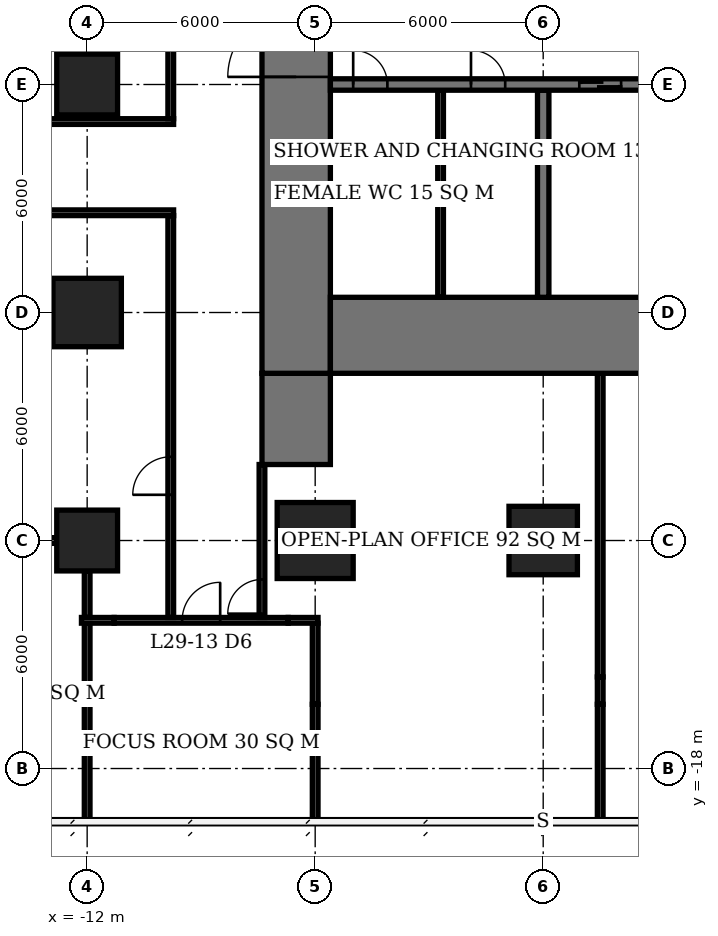
"""IFC4 building model, lengths in metres.
Left out: names, types, materials, properties, quantities, classifications, styles, units other than length and angle.
Written with IfcOpenShell. Run it as: python <this file> out.ifc"""

import sys

from ifc_helpers import new_model, si_unit, direction, frame, frame_2d, origin, origin_2d, place, context, subcontext, project, spatial, rectangle, extrude, element, fill, save


model = new_model("IFC4")
c1 = context("Model", 3, precision=1e-05, world=origin(), true_north=direction((0.0, 1.0)))
c2 = subcontext(c1, "Body", "Model", "MODEL_VIEW")
j1 = project(units=[si_unit("LENGTHUNIT", "METRE"), si_unit("PLANEANGLEUNIT", "RADIAN")], contexts=[c1])
p1 = place(None, origin())
s1 = spatial("IfcSite", under=j1, at=p1, CompositionType="ELEMENT")
p2 = place(p1, origin())
s2 = spatial("IfcBuilding", under=s1, at=p2, CompositionType="ELEMENT")
p3 = place(p2, frame((0.0, 0.0, 121.1)))
s3 = spatial("IfcBuildingStorey", under=s2, at=p3, CompositionType="ELEMENT", Elevation=121.1)
p4 = place(p3, frame((-12.0, -12.0, 0.0), z_axis=(0.0, 0.0, 1.0), x_axis=(1.0, 0.0, 0.0)))
e1 = element("IfcColumn", 1, at=p4, inside=s3, PredefinedType="COLUMN", context=c2, shape_type="SweptSolid", body=[
    extrude(rectangle(XDim=1.6, YDim=1.6, at=origin_2d()), origin(), (0.0, 0.0, 1.0), 3.9),
])
p5 = place(p3, frame((-12.0, -6.0, 0.0), z_axis=(0.0, 0.0, 1.0), x_axis=(1.0, 0.0, 0.0)))
e2 = element("IfcColumn", 2, at=p5, inside=s3, PredefinedType="COLUMN", context=c2, shape_type="SweptSolid", body=[
    extrude(rectangle(XDim=1.8, YDim=1.8, at=origin_2d()), origin(), (0.0, 0.0, 1.0), 3.9),
])
p6 = place(p3, frame((-12.0, 0.0, 0.0), z_axis=(0.0, 0.0, 1.0), x_axis=(1.0, 0.0, 0.0)))
e3 = element("IfcColumn", 3, at=p6, inside=s3, PredefinedType="COLUMN", context=c2, shape_type="SweptSolid", body=[
    extrude(rectangle(XDim=1.6, YDim=1.6, at=origin_2d()), origin(), (0.0, 0.0, 1.0), 3.9),
])
p7 = place(p3, frame((-6.0, -12.0, 0.0), z_axis=(0.0, 0.0, 1.0), x_axis=(1.0, 0.0, 0.0)))
e4 = element("IfcColumn", 4, at=p7, inside=s3, PredefinedType="COLUMN", context=c2, shape_type="SweptSolid", body=[
    extrude(rectangle(XDim=2.0, YDim=2.0, at=origin_2d()), origin(), (0.0, 0.0, 1.0), 3.9),
])
p8 = place(p3, frame((0.0, -12.0, 0.0), z_axis=(0.0, 0.0, 1.0), x_axis=(1.0, 0.0, 0.0)))
e5 = element("IfcColumn", 5, at=p8, inside=s3, PredefinedType="COLUMN", context=c2, shape_type="SweptSolid", body=[
    extrude(rectangle(XDim=1.8, YDim=1.8, at=origin_2d()), origin(), (0.0, 0.0, 1.0), 3.9),
])
p9 = place(p3, frame((-5.6, -6.6, 0.0), z_axis=(0.0, 0.0, 1.0), x_axis=(1.0, 0.0, 0.0)))
e6 = element("IfcWall", 6, at=p9, inside=s3, PredefinedType="SHEAR", context=c2, shape_type="SweptSolid", body=[
    extrude(rectangle(XDim=23.2, YDim=2.0, at=frame_2d((11.6, 0.0))), origin(), (0.0, 0.0, 1.0), 3.9),
])
p10 = place(p3, frame((-6.5, -7.6, 0.0), z_axis=(0.0, 0.0, 1.0), x_axis=(0.0, 1.0, 0.0)))
e7 = element("IfcWall", 7, at=p10, inside=s3, PredefinedType="SHEAR", context=c2, shape_type="SweptSolid", body=[
    extrude(rectangle(XDim=21.2, YDim=1.8, at=frame_2d((10.6, 0.0))), origin(), (0.0, 0.0, 1.0), 3.9),
])
p11 = place(p10, frame((7.8, 0.0, 0.0)))
e8 = element("IfcOpeningElement", 8, at=p11, cuts=e7, PredefinedType="OPENING", context=c2, shape_type="SweptSolid", body=[
    extrude(rectangle(XDim=1.8, YDim=2.4, at=frame_2d((0.9, 1.2))), frame((0.0, 0.91, 0.0), z_axis=(0.0, -1.0, 0.0), x_axis=(1.0, 0.0, 0.0)), (0.0, 0.0, 1.0), 1.82),
])
p12 = place(p3, frame((-6.5, -10.0, 0.0), z_axis=(0.0, 0.0, 1.0), x_axis=(0.0, 1.0, 0.0)))
e9 = element("IfcWall", 9, at=p12, inside=s3, PredefinedType="SHEAR", context=c2, shape_type="SweptSolid", body=[
    extrude(rectangle(XDim=2.4, YDim=1.8, at=frame_2d((1.2, 0.0))), origin(), (0.0, 0.0, 1.0), 3.9),
])
p13 = place(p3, frame((-5.6, 0.0, 0.0), z_axis=(0.0, 0.0, 1.0), x_axis=(1.0, 0.0, 0.0)))
e10 = element("IfcWall", 10, at=p13, inside=s3, PredefinedType="SHEAR", context=c2, shape_type="SweptSolid", body=[
    extrude(rectangle(XDim=17.75, YDim=0.3, at=frame_2d((8.875, 0.0))), origin(), (0.0, 0.0, 1.0), 3.9),
])
p14 = place(p13, frame((0.6, 0.0, 0.0)))
e11 = element("IfcOpeningElement", 11, at=p14, cuts=e10, PredefinedType="OPENING", context=c2, shape_type="SweptSolid", body=[
    extrude(rectangle(XDim=0.9, YDim=2.1, at=frame_2d((0.45, 1.05))), frame((0.0, 0.16, 0.0), z_axis=(0.0, -1.0, 0.0), x_axis=(1.0, 0.0, 0.0)), (0.0, 0.0, 1.0), 0.32),
])
p15 = place(p13, frame((3.7, 0.0, 0.0)))
e12 = element("IfcOpeningElement", 12, at=p15, cuts=e10, PredefinedType="OPENING", context=c2, shape_type="SweptSolid", body=[
    extrude(rectangle(XDim=0.9, YDim=2.1, at=frame_2d((0.45, 1.05))), frame((0.0, 0.16, 0.0), z_axis=(0.0, -1.0, 0.0), x_axis=(1.0, 0.0, 0.0)), (0.0, 0.0, 1.0), 0.32),
])
p16 = place(p13, frame((6.55, 0.0, 0.0)))
e13 = element("IfcOpeningElement", 13, at=p16, cuts=e10, PredefinedType="OPENING", context=c2, shape_type="SweptSolid", body=[
    extrude(rectangle(XDim=1.1, YDim=2.1, at=frame_2d((0.55, 1.05))), frame((0.0, 0.16, 0.0), z_axis=(0.0, -1.0, 0.0), x_axis=(1.0, 0.0, 0.0)), (0.0, 0.0, 1.0), 0.32),
])
p17 = place(p13, frame((9.55, 0.0, 0.0)))
e14 = element("IfcOpeningElement", 14, at=p17, cuts=e10, PredefinedType="OPENING", context=c2, shape_type="SweptSolid", body=[
    extrude(rectangle(XDim=1.1, YDim=2.1, at=frame_2d((0.55, 1.05))), frame((0.0, 0.16, 0.0), z_axis=(0.0, -1.0, 0.0), x_axis=(1.0, 0.0, 0.0)), (0.0, 0.0, 1.0), 0.32),
])
p18 = place(p3, frame((0.0, -5.6, 0.0), z_axis=(0.0, 0.0, 1.0), x_axis=(0.0, 1.0, 0.0)))
e15 = element("IfcWall", 15, at=p18, inside=s3, PredefinedType="SHEAR", context=c2, shape_type="SweptSolid", body=[
    extrude(rectangle(XDim=5.45, YDim=0.3, at=frame_2d((2.725, 0.0))), origin(), (0.0, 0.0, 1.0), 3.9),
])
p19 = place(p3, frame((-2.7, -5.6, 0.0), z_axis=(0.0, 0.0, 1.0), x_axis=(0.0, 1.0, 0.0)))
e16 = element("IfcWall", 16, at=p19, inside=s3, PredefinedType="PLUMBINGWALL", context=c2, shape_type="SweptSolid", body=[
    extrude(rectangle(XDim=5.45, YDim=0.15, at=frame_2d((2.725, 0.0))), origin(), (0.0, 0.0, 1.0), 3.65),
])
p20 = place(p3, frame((-12.15, -14.1, 0.0), z_axis=(0.0, 0.0, 1.0), x_axis=(1.0, 0.0, 0.0)))
e17 = element("IfcWall", 17, at=p20, inside=s3, PredefinedType="PARTITIONING", context=c2, shape_type="SweptSolid", body=[
    extrude(rectangle(XDim=0.86, YDim=0.15, at=frame_2d((0.43, 0.0))), origin(), (0.0, 0.0, 1.0), 2.65),
])
p21 = place(p3, frame((-11.29, -14.1, 0.0), z_axis=(0.0, 0.0, 1.0), x_axis=(1.0, 0.0, 0.0)))
e18 = element("IfcWall", 18, at=p21, inside=s3, PredefinedType="PARTITIONING", context=c2, shape_type="SweptSolid", body=[
    extrude(rectangle(XDim=4.58, YDim=0.15, at=frame_2d((2.29, 0.0))), origin(), (0.0, 0.0, 1.0), 3.65),
])
p22 = place(p21, frame((1.79, 0.0, 0.0)))
e19 = element("IfcOpeningElement", 19, at=p22, cuts=e18, PredefinedType="OPENING", context=c2, shape_type="SweptSolid", body=[
    extrude(rectangle(XDim=1.0, YDim=2.1, at=frame_2d((0.5, 1.05))), frame((0.0, 0.085, 0.0), z_axis=(0.0, -1.0, 0.0), x_axis=(1.0, 0.0, 0.0)), (0.0, 0.0, 1.0), 0.17),
])
p23 = place(p3, frame((-6.71, -14.1, 0.0), z_axis=(0.0, 0.0, 1.0), x_axis=(1.0, 0.0, 0.0)))
e20 = element("IfcWall", 20, at=p23, inside=s3, PredefinedType="PARTITIONING", context=c2, shape_type="SweptSolid", body=[
    extrude(rectangle(XDim=0.785, YDim=0.15, at=frame_2d((0.393, 0.0))), origin(), (0.0, 0.0, 1.0), 2.65),
])
p24 = place(p3, frame((-17.2, -12.0, 0.0), z_axis=(0.0, 0.0, 1.0), x_axis=(1.0, 0.0, 0.0)))
e21 = element("IfcWall", 21, at=p24, inside=s3, PredefinedType="PARTITIONING", context=c2, shape_type="SweptSolid", body=[
    extrude(rectangle(XDim=4.4, YDim=0.15, at=frame_2d((2.2, 0.0))), origin(), (0.0, 0.0, 1.0), 3.65),
])
p25 = place(p24, frame((1.7, 0.0, 0.0)))
e22 = element("IfcOpeningElement", 22, at=p25, cuts=e21, PredefinedType="OPENING", context=c2, shape_type="SweptSolid", body=[
    extrude(rectangle(XDim=1.0, YDim=2.1, at=frame_2d((0.5, 1.05))), frame((0.0, 0.085, 0.0), z_axis=(0.0, -1.0, 0.0), x_axis=(1.0, 0.0, 0.0)), (0.0, 0.0, 1.0), 0.17),
])
p26 = place(p3, frame((-12.0, -19.4, 0.0), z_axis=(0.0, 0.0, 1.0), x_axis=(0.0, 1.0, 0.0)))
e23 = element("IfcWall", 23, at=p26, inside=s3, PredefinedType="PARTITIONING", context=c2, shape_type="SweptSolid", body=[
    extrude(rectangle(XDim=3.09, YDim=0.15, at=frame_2d((1.545, 0.0))), origin(), (0.0, 0.0, 1.0), 3.65),
])
p27 = place(p3, frame((-12.0, -16.31, 0.0), z_axis=(0.0, 0.0, 1.0), x_axis=(0.0, 1.0, 0.0)))
e24 = element("IfcWall", 24, at=p27, inside=s3, PredefinedType="PARTITIONING", context=c2, shape_type="SweptSolid", body=[
    extrude(rectangle(XDim=2.135, YDim=0.15, at=frame_2d((1.067, 0.0))), origin(), (0.0, 0.0, 1.0), 2.65),
])
p28 = place(p3, frame((-12.0, -14.025, 0.0), z_axis=(0.0, 0.0, 1.0), x_axis=(0.0, 1.0, 0.0)))
e25 = element("IfcWall", 25, at=p28, inside=s3, PredefinedType="PARTITIONING", context=c2, shape_type="SweptSolid", body=[
    extrude(rectangle(XDim=1.225, YDim=0.15, at=frame_2d((0.612, 0.0))), origin(), (0.0, 0.0, 1.0), 2.65),
])
p29 = place(p3, frame((-6.0, -19.4, 0.0), z_axis=(0.0, 0.0, 1.0), x_axis=(0.0, 1.0, 0.0)))
e26 = element("IfcWall", 26, at=p29, inside=s3, PredefinedType="PARTITIONING", context=c2, shape_type="SweptSolid", body=[
    extrude(rectangle(XDim=3.09, YDim=0.15, at=frame_2d((1.545, 0.0))), origin(), (0.0, 0.0, 1.0), 3.65),
])
p30 = place(p3, frame((-6.0, -16.31, 0.0), z_axis=(0.0, 0.0, 1.0), x_axis=(0.0, 1.0, 0.0)))
e27 = element("IfcWall", 27, at=p30, inside=s3, PredefinedType="PARTITIONING", context=c2, shape_type="SweptSolid", body=[
    extrude(rectangle(XDim=2.135, YDim=0.15, at=frame_2d((1.067, 0.0))), origin(), (0.0, 0.0, 1.0), 2.65),
])
for number, where, z_axis, x_axis in (
    (28, (-17.925, -3.375, 0.0), (0.0, 0.0, 1.0), (1.0, 0.0, 0.0)),
    (29, (-17.925, -0.975, 0.0), (0.0, 0.0, 1.0), (1.0, 0.0, 0.0)),
):
    element("IfcWall", number, at=place(p3, frame(where, z_axis=z_axis, x_axis=x_axis)), inside=s3, PredefinedType="PARTITIONING", context=c2, shape_type="SweptSolid", body=[
        extrude(rectangle(XDim=8.2, YDim=0.15, at=frame_2d((4.1, 0.0))), origin(), (0.0, 0.0, 1.0), 3.65),
    ])
p31 = place(p3, frame((-9.8, -14.025, 0.0), z_axis=(0.0, 0.0, 1.0), x_axis=(0.0, 1.0, 0.0)))
e30 = element("IfcWall", 30, at=p31, inside=s3, PredefinedType="PARTITIONING", context=c2, shape_type="SweptSolid", body=[
    extrude(rectangle(XDim=10.575, YDim=0.15, at=frame_2d((5.288, 0.0))), origin(), (0.0, 0.0, 1.0), 3.65),
])
p32 = place(p31, frame((3.228, 0.0, 0.0)))
e31 = element("IfcOpeningElement", 31, at=p32, cuts=e30, PredefinedType="OPENING", context=c2, shape_type="SweptSolid", body=[
    extrude(rectangle(XDim=1.0, YDim=2.1, at=frame_2d((0.5, 1.05))), frame((0.0, 0.085, 0.0), z_axis=(0.0, -1.0, 0.0), x_axis=(1.0, 0.0, 0.0)), (0.0, 0.0, 1.0), 0.17),
])
p33 = place(p3, frame((-9.8, -0.9, 0.0), z_axis=(0.0, 0.0, 1.0), x_axis=(0.0, 1.0, 0.0)))
e32 = element("IfcWall", 32, at=p33, inside=s3, PredefinedType="PARTITIONING", context=c2, shape_type="SweptSolid", body=[
    extrude(rectangle(XDim=11.325, YDim=0.15, at=frame_2d((5.663, 0.0))), origin(), (0.0, 0.0, 1.0), 3.65),
])
p34 = place(p33, frame((3.441, 0.0, 0.0)))
e33 = element("IfcOpeningElement", 33, at=p34, cuts=e32, PredefinedType="OPENING", context=c2, shape_type="SweptSolid", body=[
    extrude(rectangle(XDim=1.0, YDim=2.1, at=frame_2d((0.5, 1.05))), frame((0.0, 0.085, 0.0), z_axis=(0.0, -1.0, 0.0), x_axis=(1.0, 0.0, 0.0)), (0.0, 0.0, 1.0), 0.17),
])
p35 = place(p3, frame((-7.4, -14.025, 0.0), z_axis=(0.0, 0.0, 1.0), x_axis=(0.0, 1.0, 0.0)))
e34 = element("IfcWall", 34, at=p35, inside=s3, PredefinedType="PARTITIONING", context=c2, shape_type="SweptSolid", body=[
    extrude(rectangle(XDim=4.025, YDim=0.15, at=frame_2d((2.012, 0.0))), origin(), (0.0, 0.0, 1.0), 3.65),
])
p36 = place(p35, frame((0.1, 0.0, 0.0)))
e35 = element("IfcOpeningElement", 35, at=p36, cuts=e34, PredefinedType="OPENING", context=c2, shape_type="SweptSolid", body=[
    extrude(rectangle(XDim=0.9, YDim=2.1, at=frame_2d((0.45, 1.05))), frame((0.0, 0.085, 0.0), z_axis=(0.0, -1.0, 0.0), x_axis=(1.0, 0.0, 0.0)), (0.0, 0.0, 1.0), 0.17),
])
p37 = place(p3, frame((1.5, -19.4, 0.0), z_axis=(0.0, 0.0, 1.0), x_axis=(0.0, 1.0, 0.0)))
e36 = element("IfcWall", 36, at=p37, inside=s3, PredefinedType="PARTITIONING", context=c2, shape_type="SweptSolid", body=[
    extrude(rectangle(XDim=3.09, YDim=0.15, at=frame_2d((1.545, 0.0))), origin(), (0.0, 0.0, 1.0), 3.65),
])
p38 = place(p3, frame((1.5, -16.31, 0.0), z_axis=(0.0, 0.0, 1.0), x_axis=(0.0, 1.0, 0.0)))
e37 = element("IfcWall", 37, at=p38, inside=s3, PredefinedType="PARTITIONING", context=c2, shape_type="SweptSolid", body=[
    extrude(rectangle(XDim=0.72, YDim=0.15, at=frame_2d((0.36, 0.0))), origin(), (0.0, 0.0, 1.0), 2.65),
])
p39 = place(p3, frame((1.5, -15.59, 0.0), z_axis=(0.0, 0.0, 1.0), x_axis=(0.0, 1.0, 0.0)))
e38 = element("IfcWall", 38, at=p39, inside=s3, PredefinedType="PARTITIONING", context=c2, shape_type="SweptSolid", body=[
    extrude(rectangle(XDim=7.99, YDim=0.15, at=frame_2d((3.995, 0.0))), origin(), (0.0, 0.0, 1.0), 3.65),
])
p40 = place(p11, origin())
e39 = element("IfcDoor", 39, at=p40, inside=s3, OperationType="DOUBLE_DOOR_SINGLE_SWING", PredefinedType="DOOR", context=c2, shape_type="SweptSolid", body=[
    extrude(rectangle(XDim=1.8, YDim=2.4, at=frame_2d((0.9, 1.2))), frame((0.0, 0.025, 0.0), z_axis=(0.0, -1.0, 0.0), x_axis=(1.0, 0.0, 0.0)), (0.0, 0.0, 1.0), 0.05),
])
fill(e8, e39)
p41 = place(p14, origin())
e40 = element("IfcDoor", 40, at=p41, inside=s3, OperationType="SINGLE_SWING_LEFT", PredefinedType="DOOR", context=c2, shape_type="SweptSolid", body=[
    extrude(rectangle(XDim=0.9, YDim=2.1, at=frame_2d((0.45, 1.05))), frame((0.0, 0.025, 0.0), z_axis=(0.0, -1.0, 0.0), x_axis=(1.0, 0.0, 0.0)), (0.0, 0.0, 1.0), 0.05),
])
fill(e11, e40)
p42 = place(p15, origin())
e41 = element("IfcDoor", 41, at=p42, inside=s3, OperationType="SINGLE_SWING_LEFT", PredefinedType="DOOR", context=c2, shape_type="SweptSolid", body=[
    extrude(rectangle(XDim=0.9, YDim=2.1, at=frame_2d((0.45, 1.05))), frame((0.0, 0.025, 0.0), z_axis=(0.0, -1.0, 0.0), x_axis=(1.0, 0.0, 0.0)), (0.0, 0.0, 1.0), 0.05),
])
fill(e12, e41)
p43 = place(p16, origin())
e42 = element("IfcDoor", 42, at=p43, inside=s3, OperationType="DOUBLE_DOOR_SLIDING", PredefinedType="USERDEFINED", context=c2, shape_type="SweptSolid", body=[
    extrude(rectangle(XDim=1.1, YDim=2.1, at=frame_2d((0.55, 1.05))), frame((0.0, 0.025, 0.0), z_axis=(0.0, -1.0, 0.0), x_axis=(1.0, 0.0, 0.0)), (0.0, 0.0, 1.0), 0.05),
])
fill(e13, e42)
p44 = place(p22, origin())
e43 = element("IfcDoor", 43, at=p44, inside=s3, OperationType="SINGLE_SWING_RIGHT", PredefinedType="DOOR", context=c2, shape_type="SweptSolid", body=[
    extrude(rectangle(XDim=1.0, YDim=2.1, at=frame_2d((0.5, 1.05))), frame((0.0, 0.025, 0.0), z_axis=(0.0, -1.0, 0.0), x_axis=(1.0, 0.0, 0.0)), (0.0, 0.0, 1.0), 0.05),
])
fill(e19, e43)
p45 = place(p32, origin())
e44 = element("IfcDoor", 44, at=p45, inside=s3, OperationType="SINGLE_SWING_LEFT", PredefinedType="DOOR", context=c2, shape_type="SweptSolid", body=[
    extrude(rectangle(XDim=1.0, YDim=2.1, at=frame_2d((0.5, 1.05))), frame((0.0, 0.025, 0.0), z_axis=(0.0, -1.0, 0.0), x_axis=(1.0, 0.0, 0.0)), (0.0, 0.0, 1.0), 0.05),
])
fill(e31, e44)
p46 = place(p36, origin())
e45 = element("IfcDoor", 45, at=p46, inside=s3, OperationType="SINGLE_SWING_LEFT", PredefinedType="DOOR", context=c2, shape_type="SweptSolid", body=[
    extrude(rectangle(XDim=0.9, YDim=2.1, at=frame_2d((0.45, 1.05))), frame((0.0, 0.025, 0.0), z_axis=(0.0, -1.0, 0.0), x_axis=(1.0, 0.0, 0.0)), (0.0, 0.0, 1.0), 0.05),
])
fill(e35, e45)
save(model, sys.argv[1])
